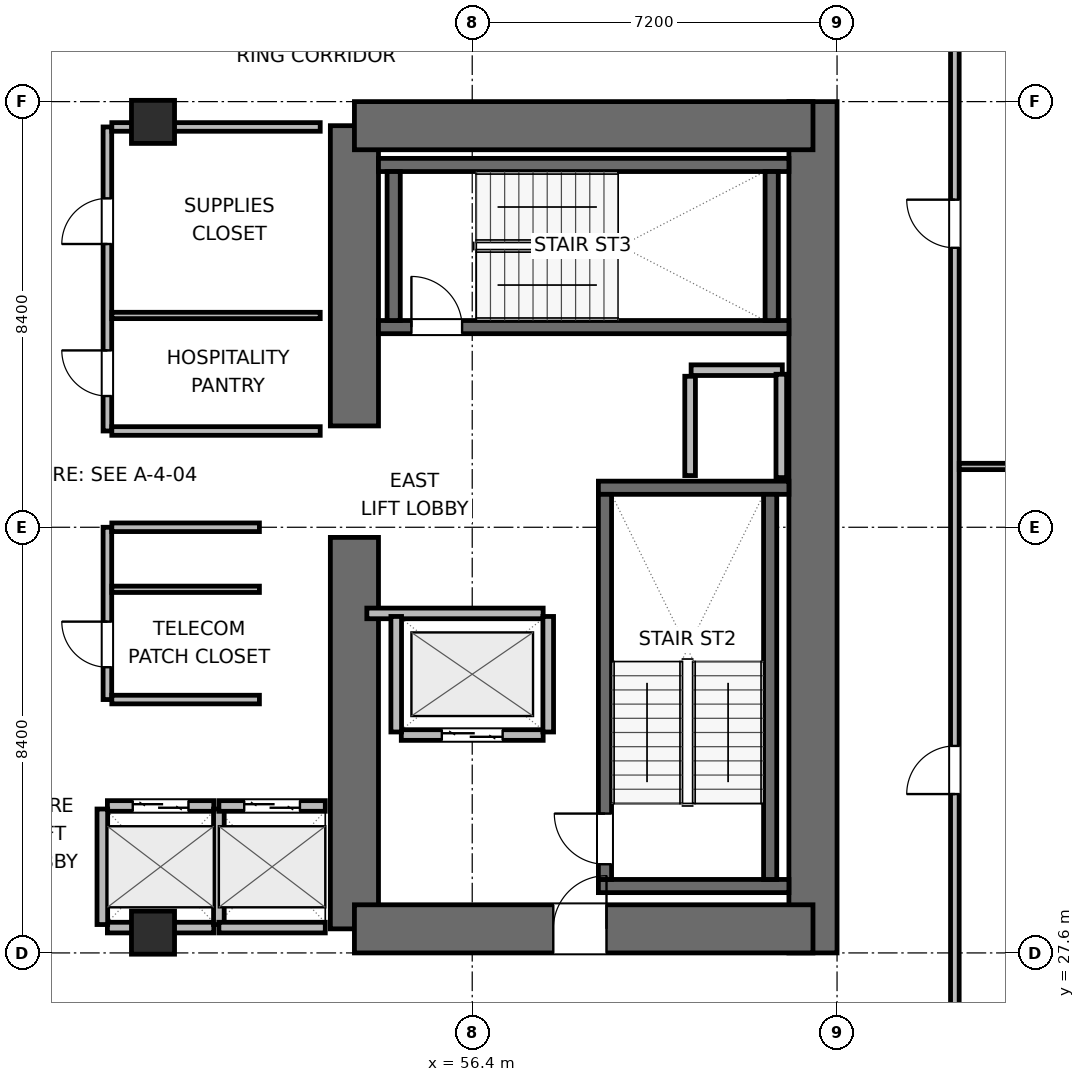
"""IFC4 building model, lengths in metres.
Left out: names, types, materials, properties, quantities, classifications, styles, units other than length and angle.
Written with IfcOpenShell. Run it as: python <this file> out.ifc"""

import sys

from ifc_helpers import new_model, si_unit, direction, frame, frame_2d, origin, origin_2d, place, context, subcontext, project, spatial, rectangle, extrude, element, fill, save


model = new_model("IFC4")
c1 = context("Model", 3, precision=1e-05, world=origin(), true_north=direction((0.0, 1.0)))
c2 = subcontext(c1, "Body", "Model", "MODEL_VIEW")
j1 = project(units=[si_unit("LENGTHUNIT", "METRE"), si_unit("PLANEANGLEUNIT", "RADIAN")], contexts=[c1])
p1 = place(None, origin())
s1 = spatial("IfcSite", under=j1, at=p1, CompositionType="ELEMENT")
p2 = place(p1, origin())
s2 = spatial("IfcBuilding", under=s1, at=p2, CompositionType="ELEMENT")
p3 = place(p2, frame((0.0, 0.0, 37.2)))
s3 = spatial("IfcBuildingStorey", under=s2, at=p3, CompositionType="ELEMENT", Elevation=37.2)
p4 = place(p3, frame((54.075, 28.075, 0.0), z_axis=(0.0, 0.0, 1.0), x_axis=(0.0, 1.0, 0.0)))
e1 = element("IfcWall", 1, at=p4, inside=s3, PredefinedType="SHEAR", context=c2, shape_type="SweptSolid", body=[
    extrude(rectangle(XDim=7.725, YDim=0.95, at=frame_2d((3.863, 0.0))), origin(), (0.0, 0.0, 1.0), 3.9),
])
p5 = place(p3, frame((54.075, 38.0, 0.0), z_axis=(0.0, 0.0, 1.0), x_axis=(0.0, 1.0, 0.0)))
e2 = element("IfcWall", 2, at=p5, inside=s3, PredefinedType="SHEAR", context=c2, shape_type="SweptSolid", body=[
    extrude(rectangle(XDim=5.925, YDim=0.95, at=frame_2d((2.962, 0.0))), origin(), (0.0, 0.0, 1.0), 3.9),
])
p6 = place(p3, frame((63.125, 27.6, 0.0), z_axis=(0.0, 0.0, 1.0), x_axis=(0.0, 1.0, 0.0)))
e3 = element("IfcWall", 3, at=p6, inside=s3, PredefinedType="SHEAR", context=c2, shape_type="SweptSolid", body=[
    extrude(rectangle(XDim=16.8, YDim=0.95, at=frame_2d((8.4, 0.0))), origin(), (0.0, 0.0, 1.0), 3.9),
])
p7 = place(p3, frame((54.075, 28.075, 0.0), z_axis=(0.0, 0.0, 1.0), x_axis=(1.0, 0.0, 0.0)))
e4 = element("IfcWall", 4, at=p7, inside=s3, PredefinedType="SHEAR", context=c2, shape_type="SweptSolid", body=[
    extrude(rectangle(XDim=9.05, YDim=0.95, at=frame_2d((4.525, 0.0))), origin(), (0.0, 0.0, 1.0), 3.9),
])
p8 = place(p7, frame((3.925, 0.0, 0.0)))
e5 = element("IfcOpeningElement", 5, at=p8, cuts=e4, PredefinedType="OPENING", context=c2, shape_type="SweptSolid", body=[
    extrude(rectangle(XDim=1.05, YDim=2.04, at=frame_2d((0.525, 1.02))), frame((0.0, 0.485, 0.0), z_axis=(0.0, -1.0, 0.0), x_axis=(1.0, 0.0, 0.0)), (0.0, 0.0, 1.0), 0.97),
])
p9 = place(p3, frame((54.075, 43.925, 0.0), z_axis=(0.0, 0.0, 1.0), x_axis=(1.0, 0.0, 0.0)))
e6 = element("IfcWall", 6, at=p9, inside=s3, PredefinedType="SHEAR", context=c2, shape_type="SweptSolid", body=[
    extrude(rectangle(XDim=9.05, YDim=0.95, at=frame_2d((4.525, 0.0))), origin(), (0.0, 0.0, 1.0), 3.9),
])
for number, where, z_axis, x_axis in (
    (7, (58.89, 28.92, 0.0), (0.0, 0.0, 1.0), (1.0, 0.0, 0.0)),
    (8, (58.89, 36.78, 0.0), (0.0, 0.0, 1.0), (1.0, 0.0, 0.0)),
):
    element("IfcWall", number, at=place(p3, frame(where, z_axis=z_axis, x_axis=x_axis)), inside=s3, PredefinedType="SHEAR", context=c2, shape_type="SweptSolid", body=[
        extrude(rectangle(XDim=3.76, YDim=0.26, at=frame_2d((1.88, 0.0))), origin(), (0.0, 0.0, 1.0), 3.9),
    ])
p10 = place(p3, frame((59.02, 29.05, 0.0), z_axis=(0.0, 0.0, 1.0), x_axis=(0.0, 1.0, 0.0)))
e9 = element("IfcWall", 9, at=p10, inside=s3, PredefinedType="SHEAR", context=c2, shape_type="SweptSolid", body=[
    extrude(rectangle(XDim=7.6, YDim=0.26, at=frame_2d((3.8, 0.0))), origin(), (0.0, 0.0, 1.0), 3.9),
])
p11 = place(p10, frame((0.3, 0.0, 0.0)))
e10 = element("IfcOpeningElement", 10, at=p11, cuts=e9, PredefinedType="OPENING", context=c2, shape_type="SweptSolid", body=[
    extrude(rectangle(XDim=1.0, YDim=2.04, at=frame_2d((0.5, 1.02))), frame((0.0, 0.14, 0.0), z_axis=(0.0, -1.0, 0.0), x_axis=(1.0, 0.0, 0.0)), (0.0, 0.0, 1.0), 0.28),
])
p12 = place(p3, frame((62.28, 29.05, 0.0), z_axis=(0.0, 0.0, 1.0), x_axis=(0.0, 1.0, 0.0)))
e11 = element("IfcWall", 11, at=p12, inside=s3, PredefinedType="SHEAR", context=c2, shape_type="SweptSolid", body=[
    extrude(rectangle(XDim=7.6, YDim=0.26, at=frame_2d((3.8, 0.0))), origin(), (0.0, 0.0, 1.0), 3.9),
])
p13 = place(p3, frame((54.55, 39.95, 0.0), z_axis=(0.0, 0.0, 1.0), x_axis=(1.0, 0.0, 0.0)))
e12 = element("IfcWall", 12, at=p13, inside=s3, PredefinedType="SHEAR", context=c2, shape_type="SweptSolid", body=[
    extrude(rectangle(XDim=8.1, YDim=0.26, at=frame_2d((4.05, 0.0))), origin(), (0.0, 0.0, 1.0), 3.9),
])
p14 = place(p13, frame((0.65, 0.0, 0.0)))
e13 = element("IfcOpeningElement", 13, at=p14, cuts=e12, PredefinedType="OPENING", context=c2, shape_type="SweptSolid", body=[
    extrude(rectangle(XDim=1.0, YDim=2.04, at=frame_2d((0.5, 1.02))), frame((0.0, 0.14, 0.0), z_axis=(0.0, -1.0, 0.0), x_axis=(1.0, 0.0, 0.0)), (0.0, 0.0, 1.0), 0.28),
])
p15 = place(p3, frame((54.55, 43.15, 0.0), z_axis=(0.0, 0.0, 1.0), x_axis=(1.0, 0.0, 0.0)))
e14 = element("IfcWall", 14, at=p15, inside=s3, PredefinedType="SHEAR", context=c2, shape_type="SweptSolid", body=[
    extrude(rectangle(XDim=8.1, YDim=0.26, at=frame_2d((4.05, 0.0))), origin(), (0.0, 0.0, 1.0), 3.9),
])
for number, where, z_axis, x_axis in (
    (15, (54.85, 40.08, 0.0), (0.0, 0.0, 1.0), (0.0, 1.0, 0.0)),
    (16, (62.31, 40.08, 0.0), (0.0, 0.0, 1.0), (0.0, 1.0, 0.0)),
):
    element("IfcWall", number, at=place(p3, frame(where, z_axis=z_axis, x_axis=x_axis)), inside=s3, PredefinedType="SHEAR", context=c2, shape_type="SweptSolid", body=[
        extrude(rectangle(XDim=2.94, YDim=0.26, at=frame_2d((1.47, 0.0))), origin(), (0.0, 0.0, 1.0), 3.9),
    ])
for number, where, z_axis, x_axis in (
    (17, (50.1, 28.0, 0.0), (0.0, 0.0, 1.0), (1.0, 0.0, 0.0)),
    (18, (50.1, 44.0, 0.0), (0.0, 0.0, 1.0), (1.0, 0.0, 0.0)),
):
    element("IfcColumn", number, at=place(p3, frame(where, z_axis=z_axis, x_axis=x_axis)), inside=s3, PredefinedType="COLUMN", context=c2, shape_type="SweptSolid", body=[
        extrude(rectangle(XDim=0.85, YDim=0.85, at=origin_2d()), origin(), (0.0, 0.0, 1.0), 3.9),
    ])
p16 = place(p3, frame((60.72, 39.1, 0.0), z_axis=(0.0, 0.0, 1.0), x_axis=(1.0, 0.0, 0.0)))
e19 = element("IfcWall", 19, at=p16, inside=s3, PredefinedType="PARTITIONING", context=c2, shape_type="SweptSolid", body=[
    extrude(rectangle(XDim=1.8, YDim=0.21, at=frame_2d((0.9, 0.0))), origin(), (0.0, 0.0, 1.0), 3.64),
])
p17 = place(p3, frame((60.7, 37.02, 0.0), z_axis=(0.0, 0.0, 1.0), x_axis=(0.0, 1.0, 0.0)))
e20 = element("IfcWall", 20, at=p17, inside=s3, PredefinedType="PARTITIONING", context=c2, shape_type="SweptSolid", body=[
    extrude(rectangle(XDim=1.96, YDim=0.21, at=frame_2d((0.98, 0.0))), origin(), (0.0, 0.0, 1.0), 3.64),
])
p18 = place(p3, frame((62.5, 36.98, 0.0), z_axis=(0.0, 0.0, 1.0), x_axis=(0.0, 1.0, 0.0)))
e21 = element("IfcWall", 21, at=p18, inside=s3, PredefinedType="PARTITIONING", context=c2, shape_type="SweptSolid", body=[
    extrude(rectangle(XDim=2.04, YDim=0.21, at=frame_2d((1.02, 0.0))), origin(), (0.0, 0.0, 1.0), 3.64),
])
p19 = place(p3, frame((55.0, 31.9, 0.0), z_axis=(0.0, 0.0, 1.0), x_axis=(1.0, 0.0, 0.0)))
e22 = element("IfcWall", 22, at=p19, inside=s3, PredefinedType="PARTITIONING", context=c2, shape_type="SweptSolid", body=[
    extrude(rectangle(XDim=2.8, YDim=0.21, at=frame_2d((1.4, 0.0))), origin(), (0.0, 0.0, 1.0), 3.64),
])
p20 = place(p19, frame((0.8, 0.0, 0.0)))
e23 = element("IfcOpeningElement", 23, at=p20, cuts=e22, PredefinedType="OPENING", context=c2, shape_type="SweptSolid", body=[
    extrude(rectangle(XDim=1.2, YDim=2.04, at=frame_2d((0.6, 1.02))), frame((0.0, 0.115, 0.0), z_axis=(0.0, -1.0, 0.0), x_axis=(1.0, 0.0, 0.0)), (0.0, 0.0, 1.0), 0.23),
])
p21 = place(p3, frame((54.32, 34.3, 0.0), z_axis=(0.0, 0.0, 1.0), x_axis=(1.0, 0.0, 0.0)))
e24 = element("IfcWall", 24, at=p21, inside=s3, PredefinedType="PARTITIONING", context=c2, shape_type="SweptSolid", body=[
    extrude(rectangle(XDim=3.48, YDim=0.21, at=frame_2d((1.74, 0.0))), origin(), (0.0, 0.0, 1.0), 3.64),
])
for number, where, z_axis, x_axis in (
    (25, (54.9, 31.96, 0.0), (0.0, 0.0, 1.0), (0.0, 1.0, 0.0)),
    (26, (57.9, 31.96, 0.0), (0.0, 0.0, 1.0), (0.0, 1.0, 0.0)),
):
    element("IfcWall", number, at=place(p3, frame(where, z_axis=z_axis, x_axis=x_axis)), inside=s3, PredefinedType="PARTITIONING", context=c2, shape_type="SweptSolid", body=[
        extrude(rectangle(XDim=2.28, YDim=0.21, at=frame_2d((1.14, 0.0))), origin(), (0.0, 0.0, 1.0), 3.64),
    ])
p22 = place(p3, frame((49.2, 30.5, 0.0), z_axis=(0.0, 0.0, 1.0), x_axis=(1.0, 0.0, 0.0)))
e27 = element("IfcWall", 27, at=p22, inside=s3, PredefinedType="PARTITIONING", context=c2, shape_type="SweptSolid", body=[
    extrude(rectangle(XDim=2.1, YDim=0.21, at=frame_2d((1.05, 0.0))), origin(), (0.0, 0.0, 1.0), 3.64),
])
p23 = place(p22, frame((0.5, 0.0, 0.0)))
e28 = element("IfcOpeningElement", 28, at=p23, cuts=e27, PredefinedType="OPENING", context=c2, shape_type="SweptSolid", body=[
    extrude(rectangle(XDim=1.1, YDim=2.04, at=frame_2d((0.55, 1.02))), frame((0.0, 0.115, 0.0), z_axis=(0.0, -1.0, 0.0), x_axis=(1.0, 0.0, 0.0)), (0.0, 0.0, 1.0), 0.23),
])
p24 = place(p3, frame((49.2, 28.1, 0.0), z_axis=(0.0, 0.0, 1.0), x_axis=(1.0, 0.0, 0.0)))
e29 = element("IfcWall", 29, at=p24, inside=s3, PredefinedType="PARTITIONING", context=c2, shape_type="SweptSolid", body=[
    extrude(rectangle(XDim=2.1, YDim=0.21, at=frame_2d((1.05, 0.0))), origin(), (0.0, 0.0, 1.0), 2.525),
])
for number, where, z_axis, x_axis in (
    (30, (49.1, 28.16, 0.0), (0.0, 0.0, 1.0), (0.0, 1.0, 0.0)),
    (31, (51.4, 28.16, 0.0), (0.0, 0.0, 1.0), (0.0, 1.0, 0.0)),
):
    element("IfcWall", number, at=place(p3, frame(where, z_axis=z_axis, x_axis=x_axis)), inside=s3, PredefinedType="PARTITIONING", context=c2, shape_type="SweptSolid", body=[
        extrude(rectangle(XDim=2.28, YDim=0.21, at=frame_2d((1.14, 0.0))), origin(), (0.0, 0.0, 1.0), 3.64),
    ])
p25 = place(p3, frame((51.4, 30.5, 0.0), z_axis=(0.0, 0.0, 1.0), x_axis=(1.0, 0.0, 0.0)))
e32 = element("IfcWall", 32, at=p25, inside=s3, PredefinedType="PARTITIONING", context=c2, shape_type="SweptSolid", body=[
    extrude(rectangle(XDim=2.1, YDim=0.21, at=frame_2d((1.05, 0.0))), origin(), (0.0, 0.0, 1.0), 3.64),
])
p26 = place(p25, frame((0.5, 0.0, 0.0)))
e33 = element("IfcOpeningElement", 33, at=p26, cuts=e32, PredefinedType="OPENING", context=c2, shape_type="SweptSolid", body=[
    extrude(rectangle(XDim=1.1, YDim=2.04, at=frame_2d((0.55, 1.02))), frame((0.0, 0.115, 0.0), z_axis=(0.0, -1.0, 0.0), x_axis=(1.0, 0.0, 0.0)), (0.0, 0.0, 1.0), 0.23),
])
p27 = place(p3, frame((51.4, 28.1, 0.0), z_axis=(0.0, 0.0, 1.0), x_axis=(1.0, 0.0, 0.0)))
e34 = element("IfcWall", 34, at=p27, inside=s3, PredefinedType="PARTITIONING", context=c2, shape_type="SweptSolid", body=[
    extrude(rectangle(XDim=2.1, YDim=0.21, at=frame_2d((1.05, 0.0))), origin(), (0.0, 0.0, 1.0), 2.525),
])
p28 = place(p3, frame((49.2, 32.6, 0.0), z_axis=(0.0, 0.0, 1.0), x_axis=(0.0, 1.0, 0.0)))
e35 = element("IfcWall", 35, at=p28, inside=s3, PredefinedType="PARTITIONING", context=c2, shape_type="SweptSolid", body=[
    extrude(rectangle(XDim=3.4, YDim=0.17, at=frame_2d((1.7, 0.0))), origin(), (0.0, 0.0, 1.0), 3.64),
])
p29 = place(p28, frame((0.638, 0.0, 0.0)))
e36 = element("IfcOpeningElement", 36, at=p29, cuts=e35, PredefinedType="OPENING", context=c2, shape_type="SweptSolid", body=[
    extrude(rectangle(XDim=0.9, YDim=2.02, at=frame_2d((0.45, 1.01))), frame((0.0, 0.095, 0.0), z_axis=(0.0, -1.0, 0.0), x_axis=(1.0, 0.0, 0.0)), (0.0, 0.0, 1.0), 0.19),
])
for number, where, z_axis, x_axis in (
    (37, (49.287, 32.6, 0.0), (0.0, 0.0, 1.0), (1.0, 0.0, 0.0)),
    (38, (49.287, 36.0, 0.0), (0.0, 0.0, 1.0), (1.0, 0.0, 0.0)),
):
    element("IfcWall", number, at=place(p3, frame(where, z_axis=z_axis, x_axis=x_axis)), inside=s3, PredefinedType="PARTITIONING", context=c2, shape_type="SweptSolid", body=[
        extrude(rectangle(XDim=2.913, YDim=0.17, at=frame_2d((1.457, 0.0))), origin(), (0.0, 0.0, 1.0), 3.64),
    ])
p30 = place(p3, frame((49.287, 34.776, 0.0), z_axis=(0.0, 0.0, 1.0), x_axis=(1.0, 0.0, 0.0)))
e39 = element("IfcWall", 39, at=p30, inside=s3, PredefinedType="PARTITIONING", context=c2, shape_type="SweptSolid", body=[
    extrude(rectangle(XDim=2.913, YDim=0.125, at=frame_2d((1.457, 0.0))), origin(), (0.0, 0.0, 1.0), 3.64),
])
p31 = place(p3, frame((49.2, 37.9, 0.0), z_axis=(0.0, 0.0, 1.0), x_axis=(0.0, 1.0, 0.0)))
e40 = element("IfcWall", 40, at=p31, inside=s3, PredefinedType="PARTITIONING", context=c2, shape_type="SweptSolid", body=[
    extrude(rectangle(XDim=6.0, YDim=0.17, at=frame_2d((3.0, 0.0))), origin(), (0.0, 0.0, 1.0), 3.64),
])
p32 = place(p31, frame((0.69, 0.0, 0.0)))
e41 = element("IfcOpeningElement", 41, at=p32, cuts=e40, PredefinedType="OPENING", context=c2, shape_type="SweptSolid", body=[
    extrude(rectangle(XDim=0.9, YDim=2.02, at=frame_2d((0.45, 1.01))), frame((0.0, 0.095, 0.0), z_axis=(0.0, -1.0, 0.0), x_axis=(1.0, 0.0, 0.0)), (0.0, 0.0, 1.0), 0.19),
])
p33 = place(p31, frame((3.69, 0.0, 0.0)))
e42 = element("IfcOpeningElement", 42, at=p33, cuts=e40, PredefinedType="OPENING", context=c2, shape_type="SweptSolid", body=[
    extrude(rectangle(XDim=0.9, YDim=2.02, at=frame_2d((0.45, 1.01))), frame((0.0, 0.095, 0.0), z_axis=(0.0, -1.0, 0.0), x_axis=(1.0, 0.0, 0.0)), (0.0, 0.0, 1.0), 0.19),
])
p34 = place(p3, frame((49.287, 37.9, 0.0), z_axis=(0.0, 0.0, 1.0), x_axis=(1.0, 0.0, 0.0)))
e43 = element("IfcWall", 43, at=p34, inside=s3, PredefinedType="PARTITIONING", context=c2, shape_type="SweptSolid", body=[
    extrude(rectangle(XDim=4.113, YDim=0.17, at=frame_2d((2.056, 0.0))), origin(), (0.0, 0.0, 1.0), 3.64),
])
p35 = place(p3, frame((49.287, 43.9, 0.0), z_axis=(0.0, 0.0, 1.0), x_axis=(1.0, 0.0, 0.0)))
e44 = element("IfcWall", 44, at=p35, inside=s3, PredefinedType="PARTITIONING", context=c2, shape_type="SweptSolid", body=[
    extrude(rectangle(XDim=4.113, YDim=0.17, at=frame_2d((2.056, 0.0))), origin(), (0.0, 0.0, 1.0), 2.525),
])
p36 = place(p3, frame((49.287, 40.18, 0.0), z_axis=(0.0, 0.0, 1.0), x_axis=(1.0, 0.0, 0.0)))
e45 = element("IfcWall", 45, at=p36, inside=s3, PredefinedType="PARTITIONING", context=c2, shape_type="SweptSolid", body=[
    extrude(rectangle(XDim=4.113, YDim=0.125, at=frame_2d((2.056, 0.0))), origin(), (0.0, 0.0, 1.0), 3.64),
])
p37 = place(p3, frame((65.925, 25.307, 0.0), z_axis=(0.0, 0.0, 1.0), x_axis=(0.0, 1.0, 0.0)))
e46 = element("IfcWall", 46, at=p37, inside=s3, PredefinedType="PARTITIONING", context=c2, shape_type="SweptSolid", body=[
    extrude(rectangle(XDim=21.386, YDim=0.17, at=frame_2d((10.693, 0.0))), origin(), (0.0, 0.0, 1.0), 3.64),
])
p38 = place(p37, frame((5.428, 0.0, 0.0)))
e47 = element("IfcOpeningElement", 47, at=p38, cuts=e46, PredefinedType="OPENING", context=c2, shape_type="SweptSolid", body=[
    extrude(rectangle(XDim=0.95, YDim=2.04, at=frame_2d((0.475, 1.02))), frame((0.0, 0.095, 0.0), z_axis=(0.0, -1.0, 0.0), x_axis=(1.0, 0.0, 0.0)), (0.0, 0.0, 1.0), 0.19),
])
p39 = place(p37, frame((16.208, 0.0, 0.0)))
e48 = element("IfcOpeningElement", 48, at=p39, cuts=e46, PredefinedType="OPENING", context=c2, shape_type="SweptSolid", body=[
    extrude(rectangle(XDim=0.95, YDim=2.04, at=frame_2d((0.475, 1.02))), frame((0.0, 0.095, 0.0), z_axis=(0.0, -1.0, 0.0), x_axis=(1.0, 0.0, 0.0)), (0.0, 0.0, 1.0), 0.19),
])
p40 = place(p3, frame((66.012, 37.2, 0.0), z_axis=(0.0, 0.0, 1.0), x_axis=(1.0, 0.0, 0.0)))
e49 = element("IfcWall", 49, at=p40, inside=s3, PredefinedType="PARTITIONING", context=c2, shape_type="SweptSolid", body=[
    extrude(rectangle(XDim=12.943, YDim=0.125, at=frame_2d((6.472, 0.0))), origin(), (0.0, 0.0, 1.0), 3.64),
])
p41 = place(p11, origin())
e50 = element("IfcDoor", 50, at=p41, inside=s3, OperationType="SINGLE_SWING_RIGHT", PredefinedType="DOOR", context=c2, shape_type="SweptSolid", body=[
    extrude(rectangle(XDim=1.0, YDim=2.04, at=frame_2d((0.5, 1.02))), frame((0.0, 0.025, 0.0), z_axis=(0.0, -1.0, 0.0), x_axis=(1.0, 0.0, 0.0)), (0.0, 0.0, 1.0), 0.05),
])
fill(e10, e50)
p42 = place(p14, origin())
e51 = element("IfcDoor", 51, at=p42, inside=s3, OperationType="SINGLE_SWING_LEFT", PredefinedType="DOOR", context=c2, shape_type="SweptSolid", body=[
    extrude(rectangle(XDim=1.0, YDim=2.04, at=frame_2d((0.5, 1.02))), frame((0.0, 0.025, 0.0), z_axis=(0.0, -1.0, 0.0), x_axis=(1.0, 0.0, 0.0)), (0.0, 0.0, 1.0), 0.05),
])
fill(e13, e51)
p43 = place(p20, origin())
e52 = element("IfcDoor", 52, at=p43, inside=s3, OperationType="DOUBLE_DOOR_SLIDING", PredefinedType="DOOR", context=c2, shape_type="SweptSolid", body=[
    extrude(rectangle(XDim=1.2, YDim=2.04, at=frame_2d((0.6, 1.02))), frame((0.0, 0.025, 0.0), z_axis=(0.0, -1.0, 0.0), x_axis=(1.0, 0.0, 0.0)), (0.0, 0.0, 1.0), 0.05),
])
fill(e23, e52)
p44 = place(p23, origin())
e53 = element("IfcDoor", 53, at=p44, inside=s3, OperationType="DOUBLE_DOOR_SLIDING", PredefinedType="DOOR", context=c2, shape_type="SweptSolid", body=[
    extrude(rectangle(XDim=1.1, YDim=2.04, at=frame_2d((0.55, 1.02))), frame((0.0, 0.025, 0.0), z_axis=(0.0, -1.0, 0.0), x_axis=(1.0, 0.0, 0.0)), (0.0, 0.0, 1.0), 0.05),
])
fill(e28, e53)
p45 = place(p26, origin())
e54 = element("IfcDoor", 54, at=p45, inside=s3, OperationType="DOUBLE_DOOR_SLIDING", PredefinedType="DOOR", context=c2, shape_type="SweptSolid", body=[
    extrude(rectangle(XDim=1.1, YDim=2.04, at=frame_2d((0.55, 1.02))), frame((0.0, 0.025, 0.0), z_axis=(0.0, -1.0, 0.0), x_axis=(1.0, 0.0, 0.0)), (0.0, 0.0, 1.0), 0.05),
])
fill(e33, e54)
p46 = place(p8, origin())
e55 = element("IfcDoor", 55, at=p46, inside=s3, OperationType="SINGLE_SWING_RIGHT", PredefinedType="DOOR", context=c2, shape_type="SweptSolid", body=[
    extrude(rectangle(XDim=1.05, YDim=2.04, at=frame_2d((0.525, 1.02))), frame((0.0, 0.025, 0.0), z_axis=(0.0, -1.0, 0.0), x_axis=(1.0, 0.0, 0.0)), (0.0, 0.0, 1.0), 0.05),
])
fill(e5, e55)
p47 = place(p29, origin())
e56 = element("IfcDoor", 56, at=p47, inside=s3, OperationType="SINGLE_SWING_RIGHT", PredefinedType="DOOR", context=c2, shape_type="SweptSolid", body=[
    extrude(rectangle(XDim=0.9, YDim=2.02, at=frame_2d((0.45, 1.01))), frame((0.0, 0.025, 0.0), z_axis=(0.0, -1.0, 0.0), x_axis=(1.0, 0.0, 0.0)), (0.0, 0.0, 1.0), 0.05),
])
fill(e36, e56)
p48 = place(p32, origin())
e57 = element("IfcDoor", 57, at=p48, inside=s3, OperationType="SINGLE_SWING_RIGHT", PredefinedType="DOOR", context=c2, shape_type="SweptSolid", body=[
    extrude(rectangle(XDim=0.9, YDim=2.02, at=frame_2d((0.45, 1.01))), frame((0.0, 0.025, 0.0), z_axis=(0.0, -1.0, 0.0), x_axis=(1.0, 0.0, 0.0)), (0.0, 0.0, 1.0), 0.05),
])
fill(e41, e57)
p49 = place(p33, origin())
e58 = element("IfcDoor", 58, at=p49, inside=s3, OperationType="SINGLE_SWING_LEFT", PredefinedType="DOOR", context=c2, shape_type="SweptSolid", body=[
    extrude(rectangle(XDim=0.9, YDim=2.02, at=frame_2d((0.45, 1.01))), frame((0.0, 0.025, 0.0), z_axis=(0.0, -1.0, 0.0), x_axis=(1.0, 0.0, 0.0)), (0.0, 0.0, 1.0), 0.05),
])
fill(e42, e58)
p50 = place(p38, origin())
e59 = element("IfcDoor", 59, at=p50, inside=s3, OperationType="SINGLE_SWING_LEFT", PredefinedType="DOOR", context=c2, shape_type="SweptSolid", body=[
    extrude(rectangle(XDim=0.95, YDim=2.04, at=frame_2d((0.475, 1.02))), frame((0.0, 0.025, 0.0), z_axis=(0.0, -1.0, 0.0), x_axis=(1.0, 0.0, 0.0)), (0.0, 0.0, 1.0), 0.05),
])
fill(e47, e59)
p51 = place(p39, origin())
e60 = element("IfcDoor", 60, at=p51, inside=s3, OperationType="SINGLE_SWING_RIGHT", PredefinedType="DOOR", context=c2, shape_type="SweptSolid", body=[
    extrude(rectangle(XDim=0.95, YDim=2.04, at=frame_2d((0.475, 1.02))), frame((0.0, 0.025, 0.0), z_axis=(0.0, -1.0, 0.0), x_axis=(1.0, 0.0, 0.0)), (0.0, 0.0, 1.0), 0.05),
])
fill(e48, e60)
save(model, sys.argv[1])
